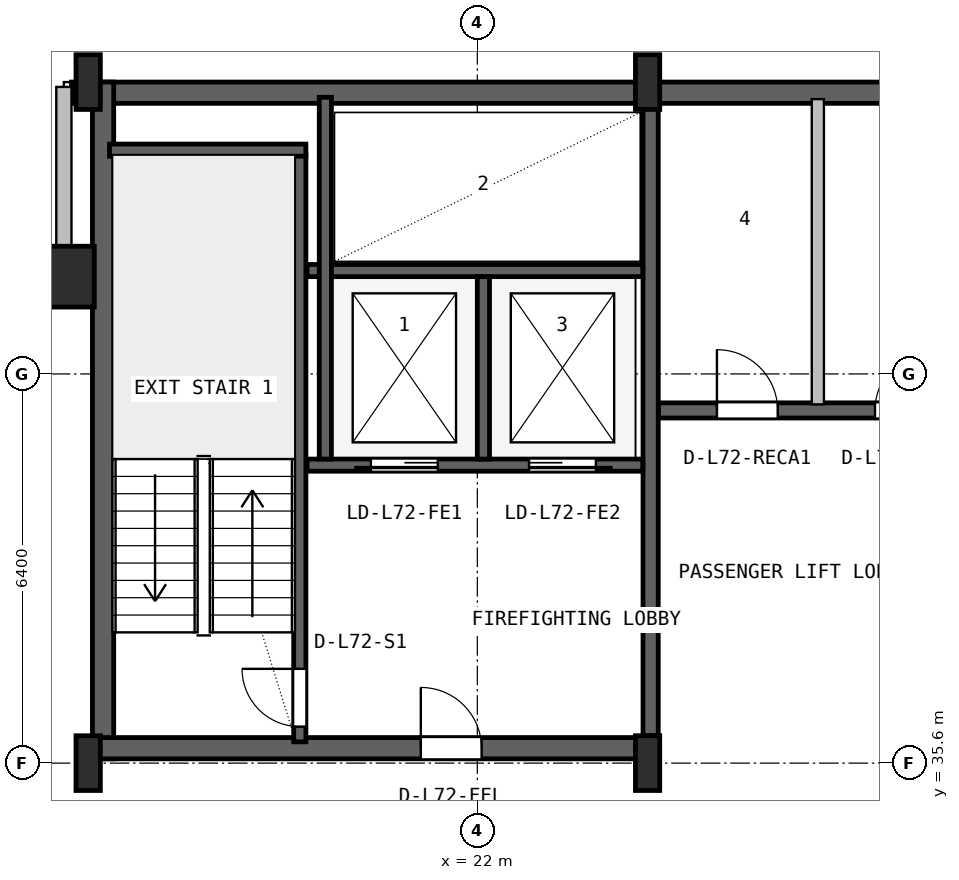
"""IFC4 building model, lengths in metres.
Left out: names, types, materials, properties, quantities, classifications, styles, units other than length and angle.
Written with IfcOpenShell. Run it as: python <this file> out.ifc"""

import sys

from ifc_helpers import new_model, si_unit, direction, frame, frame_2d, origin, origin_2d, place, context, subcontext, project, spatial, rectangle, hollow_rectangle, i_section, extrude, source, transform, mapped, element, fill, save


model = new_model("IFC4")
c1 = context("Model", 3, precision=1e-05, world=origin(), true_north=direction((0.0, 1.0)))
c2 = subcontext(c1, "Body", "Model", "MODEL_VIEW")
j1 = project(units=[si_unit("LENGTHUNIT", "METRE"), si_unit("PLANEANGLEUNIT", "RADIAN")], contexts=[c1])
p1 = place(None, origin())
s1 = spatial("IfcSite", under=j1, at=p1, CompositionType="ELEMENT")
p2 = place(p1, origin())
s2 = spatial("IfcBuilding", under=s1, at=p2, CompositionType="ELEMENT")
p3 = place(p2, frame((0.0, 0.0, 288.8)))
s3 = spatial("IfcBuildingStorey", under=s2, at=p3, CompositionType="ELEMENT", Elevation=288.8)
p4 = place(p3, frame((15.325, 46.625, 0.0), z_axis=(0.0, 0.0, 1.0), x_axis=(1.0, 0.0, 0.0)))
e1 = element("IfcWall", 1, at=p4, inside=s3, PredefinedType="SHEAR", context=c2, shape_type="SweptSolid", body=[
    extrude(rectangle(XDim=37.35, YDim=0.35, at=frame_2d((18.675, 0.0))), origin(), (0.0, 0.0, 1.0), 3.55),
])
p5 = place(p3, frame((15.845, 35.67, 0.0), z_axis=(0.0, 0.0, 1.0), x_axis=(0.0, 1.0, 0.0)))
e2 = element("IfcWall", 2, at=p5, inside=s3, PredefinedType="SHEAR", context=c2, shape_type="SweptSolid", body=[
    extrude(rectangle(XDim=11.13, YDim=0.35, at=frame_2d((5.565, 0.0))), origin(), (0.0, 0.0, 1.0), 3.55),
])
p6 = place(p3, frame((15.67, 35.845, 0.0), z_axis=(0.0, 0.0, 1.0), x_axis=(1.0, 0.0, 0.0)))
e3 = element("IfcWall", 3, at=p6, inside=s3, PredefinedType="SHEAR", context=c2, shape_type="SweptSolid", body=[
    extrude(rectangle(XDim=9.13, YDim=0.35, at=frame_2d((4.565, 0.0))), origin(), (0.0, 0.0, 1.0), 3.55),
])
p7 = place(p6, frame((5.4, 0.0, 0.0)))
e4 = element("IfcOpeningElement", 4, at=p7, cuts=e3, PredefinedType="OPENING", context=c2, shape_type="SweptSolid", body=[
    extrude(rectangle(XDim=1.0, YDim=2.1, at=frame_2d((0.5, 1.05))), frame((0.0, 0.185, 0.0), z_axis=(0.0, -1.0, 0.0), x_axis=(1.0, 0.0, 0.0)), (0.0, 0.0, 1.0), 0.37),
])
m1 = source(origin(), c2, "Body", "SweptSolid", [
    extrude(i_section(OverallWidth=0.4, OverallDepth=0.9, WebThickness=0.016, FlangeThickness=0.028, FilletRadius=0.016, at=origin_2d()), origin(), (0.0, 0.0, 1.0), 3.8),
])
for number, where, z_axis, x_axis in (
    (5, (15.6, 35.6, 0.0), (0.0, 0.0, 1.0), (1.0, 0.0, 0.0)),
    (6, (15.6, 46.8, 0.0), (0.0, 0.0, 1.0), (1.0, 0.0, 0.0)),
    (7, (24.8, 35.6, 0.0), (0.0, 0.0, 1.0), (1.0, 0.0, 0.0)),
    (8, (24.8, 46.8, 0.0), (0.0, 0.0, 1.0), (1.0, 0.0, 0.0)),
):
    element("IfcColumn", number, at=place(p3, frame(where, z_axis=z_axis, x_axis=x_axis)), inside=s3, PredefinedType="COLUMN", context=c2, shape_type="MappedRepresentation", body=[
        mapped(m1, transform((0.0, 0.0, 0.0), x_axis=(1.0, 0.0, 0.0), y_axis=(0.0, 1.0, 0.0), z_axis=(0.0, 0.0, 1.0), scale=1.0)),
    ])
m2 = source(origin(), c2, "Body", "SweptSolid", [
    extrude(hollow_rectangle(XDim=1.0, YDim=1.0, WallThickness=0.04, at=origin_2d()), origin(), (0.0, 0.0, 1.0), 3.8),
])
p8 = place(p3, frame((15.2, 43.6, 0.0), z_axis=(0.0, 0.0, 1.0), x_axis=(1.0, 0.0, 0.0)))
e9 = element("IfcColumn", 9, at=p8, inside=s3, PredefinedType="COLUMN", context=c2, shape_type="MappedRepresentation", body=[
    mapped(m2, transform((0.0, 0.0, 0.0), x_axis=(1.0, 0.0, 0.0), y_axis=(0.0, 1.0, 0.0), z_axis=(0.0, 0.0, 1.0), scale=1.0)),
])
p9 = place(p3, frame((12.08, 43.6, 0.0), z_axis=(0.0, 0.0, 1.0), x_axis=(1.0, 0.0, 0.0)))
e10 = element("IfcWall", 10, at=p9, inside=s3, PredefinedType="SOLIDWALL", context=c2, shape_type="SweptSolid", body=[
    extrude(rectangle(XDim=2.99, YDim=0.25, at=frame_2d((1.495, 0.0))), origin(), (0.0, 0.0, 1.0), 3.53),
])
p10 = place(p3, frame((15.2, 43.52, 0.0), z_axis=(0.0, 0.0, 1.0), x_axis=(0.0, 1.0, 0.0)))
e11 = element("IfcWall", 11, at=p10, inside=s3, PredefinedType="SOLIDWALL", context=c2, shape_type="SweptSolid", body=[
    extrude(rectangle(XDim=3.2, YDim=0.25, at=frame_2d((1.6, 0.0))), origin(), (0.0, 0.0, 1.0), 3.171),
])
p11 = place(p3, frame((19.08, 35.95, 0.0), z_axis=(0.0, 0.0, 1.0), x_axis=(0.0, 1.0, 0.0)))
e12 = element("IfcWall", 12, at=p11, inside=s3, PredefinedType="SHEAR", context=c2, shape_type="SweptSolid", body=[
    extrude(rectangle(XDim=9.65, YDim=0.2, at=frame_2d((4.825, 0.0))), origin(), (0.0, 0.0, 1.0), 3.55),
])
p12 = place(p11, frame((0.25, 0.0, 0.0)))
e13 = element("IfcOpeningElement", 13, at=p12, cuts=e12, PredefinedType="OPENING", context=c2, shape_type="SweptSolid", body=[
    extrude(rectangle(XDim=0.95, YDim=2.1, at=frame_2d((0.475, 1.05))), frame((0.0, 0.11, 0.0), z_axis=(0.0, -1.0, 0.0), x_axis=(1.0, 0.0, 0.0)), (0.0, 0.0, 1.0), 0.22),
])
p13 = place(p3, frame((15.95, 45.68, 0.0), z_axis=(0.0, 0.0, 1.0), x_axis=(1.0, 0.0, 0.0)))
e14 = element("IfcWall", 14, at=p13, inside=s3, PredefinedType="SHEAR", context=c2, shape_type="SweptSolid", body=[
    extrude(rectangle(XDim=3.23, YDim=0.2, at=frame_2d((1.615, 0.0))), origin(), (0.0, 0.0, 1.0), 3.55),
])
p14 = place(p3, frame((24.85, 36.05, 0.0), z_axis=(0.0, 0.0, 1.0), x_axis=(0.0, 1.0, 0.0)))
e15 = element("IfcWall", 15, at=p14, inside=s3, PredefinedType="SHEAR", context=c2, shape_type="SweptSolid", body=[
    extrude(rectangle(XDim=10.45, YDim=0.25, at=frame_2d((5.225, 0.0))), origin(), (0.0, 0.0, 1.0), 3.55),
])
p15 = place(p3, frame((19.2, 40.5, 0.0), z_axis=(0.0, 0.0, 1.0), x_axis=(1.0, 0.0, 0.0)))
e16 = element("IfcWall", 16, at=p15, inside=s3, PredefinedType="SHEAR", context=c2, shape_type="SweptSolid", body=[
    extrude(rectangle(XDim=5.52, YDim=0.2, at=frame_2d((2.76, 0.0))), origin(), (0.0, 0.0, 1.0), 3.55),
])
p16 = place(p15, frame((1.05, 0.0, 0.0)))
e17 = element("IfcOpeningElement", 17, at=p16, cuts=e16, PredefinedType="OPENING", context=c2, shape_type="SweptSolid", body=[
    extrude(rectangle(XDim=1.1, YDim=2.18, at=frame_2d((0.55, 1.09))), frame((0.0, 0.11, 0.0), z_axis=(0.0, -1.0, 0.0), x_axis=(1.0, 0.0, 0.0)), (0.0, 0.0, 1.0), 0.22),
])
p17 = place(p15, frame((3.65, 0.0, 0.0)))
e18 = element("IfcOpeningElement", 18, at=p17, cuts=e16, PredefinedType="OPENING", context=c2, shape_type="SweptSolid", body=[
    extrude(rectangle(XDim=1.1, YDim=2.18, at=frame_2d((0.55, 1.09))), frame((0.0, 0.11, 0.0), z_axis=(0.0, -1.0, 0.0), x_axis=(1.0, 0.0, 0.0)), (0.0, 0.0, 1.0), 0.22),
])
p18 = place(p3, frame((19.2, 43.7, 0.0), z_axis=(0.0, 0.0, 1.0), x_axis=(1.0, 0.0, 0.0)))
e19 = element("IfcWall", 19, at=p18, inside=s3, PredefinedType="SHEAR", context=c2, shape_type="SweptSolid", body=[
    extrude(rectangle(XDim=5.52, YDim=0.2, at=frame_2d((2.76, 0.0))), origin(), (0.0, 0.0, 1.0), 3.55),
])
p19 = place(p3, frame((22.1, 40.6, 0.0), z_axis=(0.0, 0.0, 1.0), x_axis=(0.0, 1.0, 0.0)))
e20 = element("IfcWall", 20, at=p19, inside=s3, PredefinedType="SHEAR", context=c2, shape_type="SweptSolid", body=[
    extrude(rectangle(XDim=3.0, YDim=0.2, at=frame_2d((1.5, 0.0))), origin(), (0.0, 0.0, 1.0), 3.55),
])
p20 = place(p3, frame((19.5, 40.6, 0.0), z_axis=(0.0, 0.0, 1.0), x_axis=(0.0, 1.0, 0.0)))
e21 = element("IfcWall", 21, at=p20, inside=s3, PredefinedType="SHEAR", context=c2, shape_type="SweptSolid", body=[
    extrude(rectangle(XDim=5.95, YDim=0.2, at=frame_2d((2.975, 0.0))), origin(), (0.0, 0.0, 1.0), 3.55),
])
p21 = place(p3, frame((24.98, 41.4, 0.0), z_axis=(0.0, 0.0, 1.0), x_axis=(1.0, 0.0, 0.0)))
e22 = element("IfcWall", 22, at=p21, inside=s3, PredefinedType="SHEAR", context=c2, shape_type="SweptSolid", body=[
    extrude(rectangle(XDim=23.82, YDim=0.25, at=frame_2d((11.91, 0.0))), origin(), (0.0, 0.0, 1.0), 3.55),
])
p22 = place(p21, frame((16.87, 0.0, 0.0)))
e23 = element("IfcOpeningElement", 23, at=p22, cuts=e22, PredefinedType="OPENING", context=c2, shape_type="SweptSolid", body=[
    extrude(rectangle(XDim=1.1, YDim=2.18, at=frame_2d((0.55, 1.09))), frame((0.0, 0.135, 0.0), z_axis=(0.0, -1.0, 0.0), x_axis=(1.0, 0.0, 0.0)), (0.0, 0.0, 1.0), 0.27),
])
p23 = place(p21, frame((19.47, 0.0, 0.0)))
e24 = element("IfcOpeningElement", 24, at=p23, cuts=e22, PredefinedType="OPENING", context=c2, shape_type="SweptSolid", body=[
    extrude(rectangle(XDim=1.1, YDim=2.18, at=frame_2d((0.55, 1.09))), frame((0.0, 0.135, 0.0), z_axis=(0.0, -1.0, 0.0), x_axis=(1.0, 0.0, 0.0)), (0.0, 0.0, 1.0), 0.27),
])
p24 = place(p21, frame((22.07, 0.0, 0.0)))
e25 = element("IfcOpeningElement", 25, at=p24, cuts=e22, PredefinedType="OPENING", context=c2, shape_type="SweptSolid", body=[
    extrude(rectangle(XDim=1.1, YDim=2.18, at=frame_2d((0.55, 1.09))), frame((0.0, 0.135, 0.0), z_axis=(0.0, -1.0, 0.0), x_axis=(1.0, 0.0, 0.0)), (0.0, 0.0, 1.0), 0.27),
])
p25 = place(p21, frame((0.96, 0.0, 0.0)))
e26 = element("IfcOpeningElement", 26, at=p25, cuts=e22, PredefinedType="OPENING", context=c2, shape_type="SweptSolid", body=[
    extrude(rectangle(XDim=1.0, YDim=2.08, at=frame_2d((0.5, 1.04))), frame((0.0, 0.135, 0.0), z_axis=(0.0, -1.0, 0.0), x_axis=(1.0, 0.0, 0.0)), (0.0, 0.0, 1.0), 0.27),
])
p26 = place(p21, frame((3.56, 0.0, 0.0)))
e27 = element("IfcOpeningElement", 27, at=p26, cuts=e22, PredefinedType="OPENING", context=c2, shape_type="SweptSolid", body=[
    extrude(rectangle(XDim=1.0, YDim=2.08, at=frame_2d((0.5, 1.04))), frame((0.0, 0.135, 0.0), z_axis=(0.0, -1.0, 0.0), x_axis=(1.0, 0.0, 0.0)), (0.0, 0.0, 1.0), 0.27),
])
p27 = place(p21, frame((6.16, 0.0, 0.0)))
e28 = element("IfcOpeningElement", 28, at=p27, cuts=e22, PredefinedType="OPENING", context=c2, shape_type="SweptSolid", body=[
    extrude(rectangle(XDim=0.92, YDim=2.08, at=frame_2d((0.46, 1.04))), frame((0.0, 0.135, 0.0), z_axis=(0.0, -1.0, 0.0), x_axis=(1.0, 0.0, 0.0)), (0.0, 0.0, 1.0), 0.27),
])
p28 = place(p21, frame((11.56, 0.0, 0.0)))
e29 = element("IfcOpeningElement", 29, at=p28, cuts=e22, PredefinedType="OPENING", context=c2, shape_type="SweptSolid", body=[
    extrude(rectangle(XDim=1.0, YDim=2.08, at=frame_2d((0.5, 1.04))), frame((0.0, 0.135, 0.0), z_axis=(0.0, -1.0, 0.0), x_axis=(1.0, 0.0, 0.0)), (0.0, 0.0, 1.0), 0.27),
])
p29 = place(p3, frame((27.6, 41.5, 0.0), z_axis=(0.0, 0.0, 1.0), x_axis=(0.0, 1.0, 0.0)))
e30 = element("IfcWall", 30, at=p29, inside=s3, PredefinedType="SOLIDWALL", context=c2, shape_type="SweptSolid", body=[
    extrude(rectangle(XDim=5.02, YDim=0.2, at=frame_2d((2.51, 0.0))), origin(), (0.0, 0.0, 1.0), 3.53),
])
m3 = source(origin(), c2, "Body", "SweptSolid", [
    extrude(rectangle(XDim=0.95, YDim=2.1, at=frame_2d((0.475, 1.05))), frame((0.0, 0.025, 0.0), z_axis=(0.0, -1.0, 0.0), x_axis=(1.0, 0.0, 0.0)), (0.0, 0.0, 1.0), 0.05),
])
p30 = place(p12, origin())
e31 = element("IfcDoor", 31, at=p30, inside=s3, OperationType="SINGLE_SWING_RIGHT", PredefinedType="DOOR", context=c2, shape_type="MappedRepresentation", body=[
    mapped(m3, transform((0.0, 0.0, 0.0), x_axis=(1.0, 0.0, 0.0), y_axis=(0.0, 1.0, 0.0), z_axis=(0.0, 0.0, 1.0), scale=1.0)),
])
fill(e13, e31)
m4 = source(origin(), c2, "Body", "SweptSolid", [
    extrude(rectangle(XDim=1.0, YDim=2.1, at=frame_2d((0.5, 1.05))), frame((0.0, 0.025, 0.0), z_axis=(0.0, -1.0, 0.0), x_axis=(1.0, 0.0, 0.0)), (0.0, 0.0, 1.0), 0.05),
])
p31 = place(p7, origin())
e32 = element("IfcDoor", 32, at=p31, inside=s3, OperationType="SINGLE_SWING_LEFT", PredefinedType="DOOR", context=c2, shape_type="MappedRepresentation", body=[
    mapped(m4, transform((0.0, 0.0, 0.0), x_axis=(1.0, 0.0, 0.0), y_axis=(0.0, 1.0, 0.0), z_axis=(0.0, 0.0, 1.0), scale=1.0)),
])
fill(e4, e32)
m5 = source(origin(), c2, "Body", "SweptSolid", [
    extrude(rectangle(XDim=1.1, YDim=2.18, at=frame_2d((0.55, 1.09))), frame((0.0, 0.025, 0.0), z_axis=(0.0, -1.0, 0.0), x_axis=(1.0, 0.0, 0.0)), (0.0, 0.0, 1.0), 0.05),
])
p32 = place(p16, frame((1.1, 0.0, 0.0), z_axis=(0.0, 0.0, 1.0), x_axis=(-1.0, 0.0, 0.0)))
e33 = element("IfcDoor", 33, at=p32, inside=s3, OperationType="SLIDING_TO_LEFT", PredefinedType="DOOR", context=c2, shape_type="MappedRepresentation", body=[
    mapped(m5, transform((0.0, 0.0, 0.0), x_axis=(1.0, 0.0, 0.0), y_axis=(0.0, 1.0, 0.0), z_axis=(0.0, 0.0, 1.0), scale=1.0)),
])
fill(e17, e33)
p33 = place(p17, frame((1.1, 0.0, 0.0), z_axis=(0.0, 0.0, 1.0), x_axis=(-1.0, 0.0, 0.0)))
e34 = element("IfcDoor", 34, at=p33, inside=s3, OperationType="SLIDING_TO_RIGHT", PredefinedType="DOOR", context=c2, shape_type="MappedRepresentation", body=[
    mapped(m5, transform((0.0, 0.0, 0.0), x_axis=(1.0, 0.0, 0.0), y_axis=(0.0, 1.0, 0.0), z_axis=(0.0, 0.0, 1.0), scale=1.0)),
])
fill(e18, e34)
m6 = source(origin(), c2, "Body", "SweptSolid", [
    extrude(rectangle(XDim=1.0, YDim=2.08, at=frame_2d((0.5, 1.04))), frame((0.0, 0.025, 0.0), z_axis=(0.0, -1.0, 0.0), x_axis=(1.0, 0.0, 0.0)), (0.0, 0.0, 1.0), 0.05),
])
p34 = place(p25, origin())
e35 = element("IfcDoor", 35, at=p34, inside=s3, OperationType="SINGLE_SWING_LEFT", PredefinedType="DOOR", context=c2, shape_type="MappedRepresentation", body=[
    mapped(m6, transform((0.0, 0.0, 0.0), x_axis=(1.0, 0.0, 0.0), y_axis=(0.0, 1.0, 0.0), z_axis=(0.0, 0.0, 1.0), scale=1.0)),
])
fill(e26, e35)
p35 = place(p26, origin())
e36 = element("IfcDoor", 36, at=p35, inside=s3, OperationType="SINGLE_SWING_RIGHT", PredefinedType="DOOR", context=c2, shape_type="MappedRepresentation", body=[
    mapped(m6, transform((0.0, 0.0, 0.0), x_axis=(1.0, 0.0, 0.0), y_axis=(0.0, 1.0, 0.0), z_axis=(0.0, 0.0, 1.0), scale=1.0)),
])
fill(e27, e36)
save(model, sys.argv[1])
